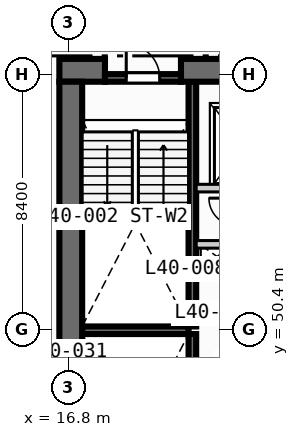
"""IFC4 building model, lengths in metres.
Left out: names, types, materials, properties, quantities, classifications, styles, units other than length and angle.
Written with IfcOpenShell. Run it as: python <this file> out.ifc"""

import sys

from ifc_helpers import new_model, si_unit, direction, frame, frame_2d, origin, place, context, subcontext, project, spatial, rectangle, extrude, element, fill, save


model = new_model("IFC4")
c1 = context("Model", 3, precision=1e-05, world=origin(), true_north=direction((0.0, 1.0)))
c2 = subcontext(c1, "Body", "Model", "MODEL_VIEW")
j1 = project(units=[si_unit("LENGTHUNIT", "METRE"), si_unit("PLANEANGLEUNIT", "RADIAN")], contexts=[c1])
p1 = place(None, origin())
s1 = spatial("IfcSite", under=j1, at=p1, CompositionType="ELEMENT")
p2 = place(p1, origin())
s2 = spatial("IfcBuilding", under=s1, at=p2, CompositionType="ELEMENT")
p3 = place(p2, frame((0.0, 0.0, 168.0)))
s3 = spatial("IfcBuildingStorey", under=s2, at=p3, CompositionType="ELEMENT", Elevation=168.0)
for number, where, z_axis, x_axis in (
    (1, (20.875, 42.2, 0.0), (0.0, 0.0, 1.0), (0.0, 1.0, 0.0)),
    (2, (20.875, 50.5, 0.0), (0.0, 0.0, 1.0), (0.0, 1.0, 0.0)),
):
    element("IfcWall", number, at=place(p3, frame(where, z_axis=z_axis, x_axis=x_axis)), inside=s3, PredefinedType="SOLIDWALL", context=c2, shape_type="SweptSolid", body=[
        extrude(rectangle(XDim=8.05, YDim=0.25, at=frame_2d((4.025, 0.0))), origin(), (0.0, 0.0, 1.0), 3.47),
    ])
p4 = place(p3, frame((17.25, 50.375, 0.0), z_axis=(0.0, 0.0, 1.0), x_axis=(1.0, 0.0, 0.0)))
e3 = element("IfcWall", 3, at=p4, inside=s3, PredefinedType="SOLIDWALL", context=c2, shape_type="SweptSolid", body=[
    extrude(rectangle(XDim=3.5, YDim=0.25, at=frame_2d((1.75, 0.0))), origin(), (0.0, 0.0, 1.0), 3.47),
])
p5 = place(p3, frame((16.5, 58.925, 0.0), z_axis=(0.0, 0.0, 1.0), x_axis=(1.0, 0.0, 0.0)))
e4 = element("IfcWall", 4, at=p5, inside=s3, PredefinedType="SHEAR", context=c2, shape_type="SweptSolid", body=[
    extrude(rectangle(XDim=1.5, YDim=0.75, at=frame_2d((0.75, 0.0))), origin(), (0.0, 0.0, 1.0), 3.47),
])
p6 = place(p3, frame((20.5, 58.925, 0.0), z_axis=(0.0, 0.0, 1.0), x_axis=(1.0, 0.0, 0.0)))
e5 = element("IfcWall", 5, at=p6, inside=s3, PredefinedType="SHEAR", context=c2, shape_type="SweptSolid", body=[
    extrude(rectangle(XDim=5.075, YDim=0.75, at=frame_2d((2.538, 0.0))), origin(), (0.0, 0.0, 1.0), 3.47),
])
p7 = place(p3, frame((16.875, 42.2, 0.0), z_axis=(0.0, 0.0, 1.0), x_axis=(0.0, 1.0, 0.0)))
e6 = element("IfcWall", 6, at=p7, inside=s3, PredefinedType="SHEAR", context=c2, shape_type="SweptSolid", body=[
    extrude(rectangle(XDim=16.35, YDim=0.75, at=frame_2d((8.175, 0.0))), origin(), (0.0, 0.0, 1.0), 3.47),
])
p8 = place(p3, frame((18.0, 58.675, 0.0), z_axis=(0.0, 0.0, 1.0), x_axis=(1.0, 0.0, 0.0)))
e7 = element("IfcWall", 7, at=p8, inside=s3, PredefinedType="SOLIDWALL", context=c2, shape_type="SweptSolid", body=[
    extrude(rectangle(XDim=2.5, YDim=0.25, at=frame_2d((1.25, 0.0))), origin(), (0.0, 0.0, 1.0), 3.47),
])
p9 = place(p8, frame((0.7, 0.0, 0.0)))
e8 = element("IfcOpeningElement", 8, at=p9, cuts=e7, PredefinedType="OPENING", context=c2, shape_type="SweptSolid", body=[
    extrude(rectangle(XDim=1.1, YDim=2.15, at=frame_2d((0.55, 1.075))), frame((0.0, 0.135, 0.0), z_axis=(0.0, -1.0, 0.0), x_axis=(1.0, 0.0, 0.0)), (0.0, 0.0, 1.0), 0.27),
])
p10 = place(p3, frame((21.0, 52.34, 0.0), z_axis=(0.0, 0.0, 1.0), x_axis=(1.0, 0.0, 0.0)))
e9 = element("IfcWall", 9, at=p10, inside=s3, PredefinedType="SOLIDWALL", context=c2, shape_type="SweptSolid", body=[
    extrude(rectangle(XDim=3.825, YDim=0.25, at=frame_2d((1.913, 0.0))), origin(), (0.0, 0.0, 1.0), 3.47),
])
p11 = place(p3, frame((21.0, 55.05, 0.0), z_axis=(0.0, 0.0, 1.0), x_axis=(1.0, 0.0, 0.0)))
e10 = element("IfcWall", 10, at=p11, inside=s3, PredefinedType="SOLIDWALL", context=c2, shape_type="SweptSolid", body=[
    extrude(rectangle(XDim=4.15, YDim=0.25, at=frame_2d((2.075, 0.0))), origin(), (0.0, 0.0, 1.0), 3.47),
])
p12 = place(p11, frame((1.85, 0.0, 0.0)))
e11 = element("IfcOpeningElement", 11, at=p12, cuts=e10, PredefinedType="OPENING", context=c2, shape_type="SweptSolid", body=[
    extrude(rectangle(XDim=1.1, YDim=2.15, at=frame_2d((0.55, 1.075))), frame((0.0, 0.135, 0.0), z_axis=(0.0, -1.0, 0.0), x_axis=(1.0, 0.0, 0.0)), (0.0, 0.0, 1.0), 0.27),
])
p13 = place(p3, frame((21.0, 53.2, 0.0), z_axis=(0.0, 0.0, 1.0), x_axis=(1.0, 0.0, 0.0)))
e12 = element("IfcWall", 12, at=p13, inside=s3, PredefinedType="SOLIDWALL", context=c2, shape_type="SweptSolid", body=[
    extrude(rectangle(XDim=1.3, YDim=0.25, at=frame_2d((0.65, 0.0))), origin(), (0.0, 0.0, 1.0), 3.47),
])
p14 = place(p9, origin())
e13 = element("IfcDoor", 13, at=p14, inside=s3, OperationType="SINGLE_SWING_LEFT", PredefinedType="DOOR", context=c2, shape_type="SweptSolid", body=[
    extrude(rectangle(XDim=1.1, YDim=2.15, at=frame_2d((0.55, 1.075))), frame((0.0, 0.025, 0.0), z_axis=(0.0, -1.0, 0.0), x_axis=(1.0, 0.0, 0.0)), (0.0, 0.0, 1.0), 0.05),
])
fill(e8, e13)
save(model, sys.argv[1])
